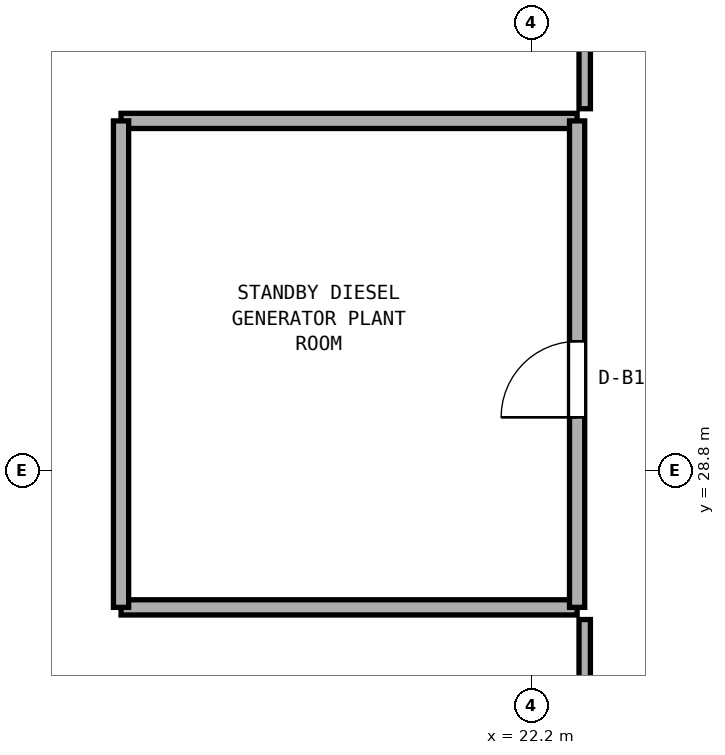
"""IFC4 building model, lengths in metres.
Left out: names, types, materials, properties, quantities, classifications, styles, units other than length and angle.
Written with IfcOpenShell. Run it as: python <this file> out.ifc"""

import sys

from ifc_helpers import new_model, si_unit, direction, frame, frame_2d, origin, place, context, subcontext, project, spatial, rectangle, extrude, element, fill, save


model = new_model("IFC4")
c1 = context("Model", 3, precision=1e-05, world=origin(), true_north=direction((0.0, 1.0)))
c2 = subcontext(c1, "Body", "Model", "MODEL_VIEW")
j1 = project(units=[si_unit("LENGTHUNIT", "METRE"), si_unit("PLANEANGLEUNIT", "RADIAN")], contexts=[c1])
p1 = place(None, origin())
s1 = spatial("IfcSite", under=j1, at=p1, CompositionType="ELEMENT")
p2 = place(p1, origin())
s2 = spatial("IfcBuilding", under=s1, at=p2, CompositionType="ELEMENT")
p3 = place(p2, frame((0.0, 0.0, -4.8)))
s3 = spatial("IfcBuildingStorey", under=s2, at=p3, CompositionType="ELEMENT", Elevation=-4.8)
for number, where, z_axis, x_axis in (
    (1, (16.8, 27.0, 0.0), (0.0, 0.0, 1.0), (1.0, 0.0, 0.0)),
    (2, (16.8, 33.4, 0.0), (0.0, 0.0, 1.0), (1.0, 0.0, 0.0)),
):
    element("IfcWall", number, at=place(p3, frame(where, z_axis=z_axis, x_axis=x_axis)), inside=s3, PredefinedType="SOLIDWALL", context=c2, shape_type="SweptSolid", body=[
        extrude(rectangle(XDim=6.0, YDim=0.2, at=frame_2d((3.0, 0.0))), origin(), (0.0, 0.0, 1.0), 4.45),
    ])
p4 = place(p3, frame((16.8, 27.0, 0.0), z_axis=(0.0, 0.0, 1.0), x_axis=(0.0, 1.0, 0.0)))
e3 = element("IfcWall", 3, at=p4, inside=s3, PredefinedType="SOLIDWALL", context=c2, shape_type="SweptSolid", body=[
    extrude(rectangle(XDim=6.4, YDim=0.2, at=frame_2d((3.2, 0.0))), origin(), (0.0, 0.0, 1.0), 4.45),
])
p5 = place(p3, frame((22.8, 27.0, 0.0), z_axis=(0.0, 0.0, 1.0), x_axis=(0.0, 1.0, 0.0)))
e4 = element("IfcWall", 4, at=p5, inside=s3, PredefinedType="SOLIDWALL", context=c2, shape_type="SweptSolid", body=[
    extrude(rectangle(XDim=6.4, YDim=0.2, at=frame_2d((3.2, 0.0))), origin(), (0.0, 0.0, 1.0), 4.45),
])
p6 = place(p5, frame((2.5, 0.0, 0.0)))
e5 = element("IfcOpeningElement", 5, at=p6, cuts=e4, PredefinedType="OPENING", context=c2, shape_type="SweptSolid", body=[
    extrude(rectangle(XDim=1.0, YDim=2.12, at=frame_2d((0.5, 1.06))), frame((0.0, 0.11, 0.0), z_axis=(0.0, -1.0, 0.0), x_axis=(1.0, 0.0, 0.0)), (0.0, 0.0, 1.0), 0.22),
])
p7 = place(p3, frame((22.9, 23.56, 0.0), z_axis=(0.0, 0.0, 1.0), x_axis=(0.0, 1.0, 0.0)))
e6 = element("IfcWall", 6, at=p7, inside=s3, PredefinedType="PARTITIONING", context=c2, shape_type="SweptSolid", body=[
    extrude(rectangle(XDim=3.28, YDim=0.15, at=frame_2d((1.64, 0.0))), origin(), (0.0, 0.0, 1.0), 4.45),
])
p8 = place(p3, frame((22.9, 33.56, 0.0), z_axis=(0.0, 0.0, 1.0), x_axis=(0.0, 1.0, 0.0)))
e7 = element("IfcWall", 7, at=p8, inside=s3, PredefinedType="PARTITIONING", context=c2, shape_type="SweptSolid", body=[
    extrude(rectangle(XDim=3.94, YDim=0.15, at=frame_2d((1.97, 0.0))), origin(), (0.0, 0.0, 1.0), 4.45),
])
p9 = place(p6, origin())
e8 = element("IfcDoor", 8, at=p9, inside=s3, OperationType="SINGLE_SWING_LEFT", PredefinedType="DOOR", context=c2, shape_type="SweptSolid", body=[
    extrude(rectangle(XDim=1.0, YDim=2.12, at=frame_2d((0.5, 1.06))), frame((0.0, 0.025, 0.0), z_axis=(0.0, -1.0, 0.0), x_axis=(1.0, 0.0, 0.0)), (0.0, 0.0, 1.0), 0.05),
])
fill(e5, e8)
save(model, sys.argv[1])
